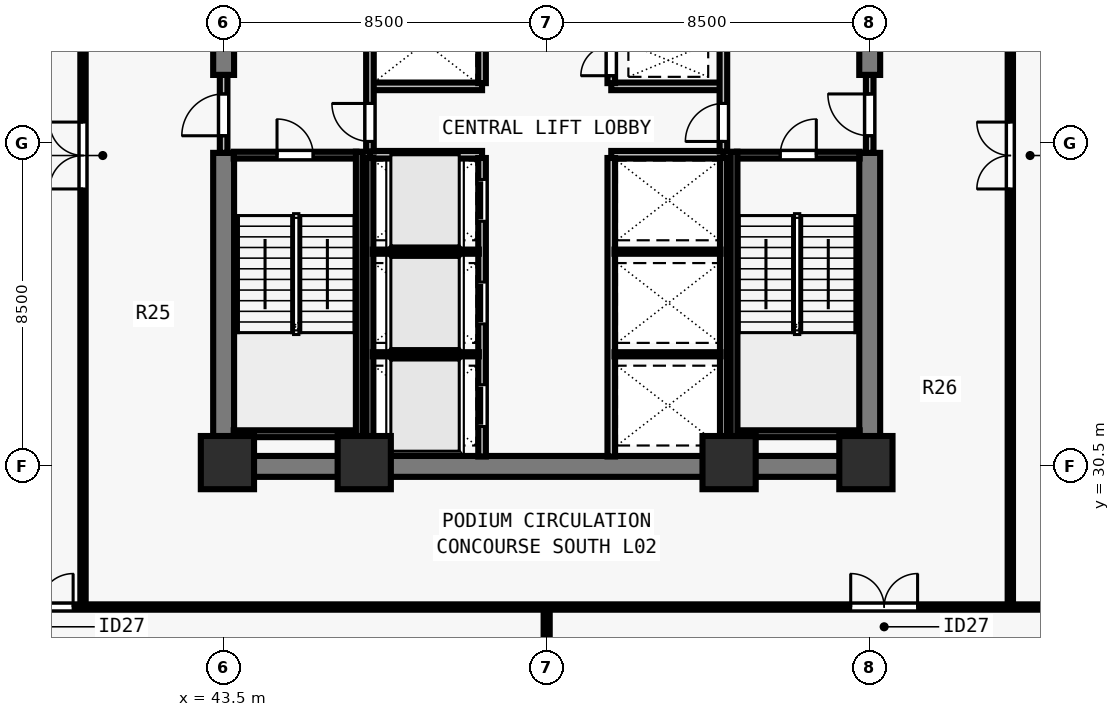
"""IFC4 building model, lengths in metres.
Left out: names, types, materials, properties, quantities, classifications, styles, units other than length and angle.
Written with IfcOpenShell. Run it as: python <this file> out.ifc"""

import sys

from ifc_helpers import new_model, si_unit, direction, frame, frame_2d, origin, origin_2d, place, context, subcontext, project, spatial, rectangle, extrude, element, fill, save


model = new_model("IFC4")
c1 = context("Model", 3, precision=1e-05, world=origin(), true_north=direction((0.0, 1.0)))
c2 = subcontext(c1, "Body", "Model", "MODEL_VIEW")
j1 = project(units=[si_unit("LENGTHUNIT", "METRE"), si_unit("PLANEANGLEUNIT", "RADIAN")], contexts=[c1])
p1 = place(None, origin())
s1 = spatial("IfcSite", under=j1, at=p1, CompositionType="ELEMENT")
p2 = place(p1, origin())
s2 = spatial("IfcBuilding", under=s1, at=p2, CompositionType="ELEMENT")
p3 = place(p2, frame((0.0, 0.0, 10.0)))
s3 = spatial("IfcBuildingStorey", under=s2, at=p3, CompositionType="ELEMENT", Elevation=10.0)
for number, where, z_axis, x_axis in (
    (1, (43.6, 30.6, 0.0), (0.0, 0.0, 1.0), (1.0, 0.0, 0.0)),
    (2, (47.2, 30.6, 0.0), (0.0, 0.0, 1.0), (1.0, 0.0, 0.0)),
    (3, (56.8, 30.6, 0.0), (0.0, 0.0, 1.0), (1.0, 0.0, 0.0)),
    (4, (60.4, 30.6, 0.0), (0.0, 0.0, 1.0), (1.0, 0.0, 0.0)),
):
    element("IfcColumn", number, at=place(p3, frame(where, z_axis=z_axis, x_axis=x_axis)), inside=s3, PredefinedType="COLUMN", context=c2, shape_type="SweptSolid", body=[
        extrude(rectangle(XDim=1.4, YDim=1.4, at=origin_2d()), origin(), (0.0, 0.0, 1.0), 4.5),
    ])
p4 = place(p3, frame((43.225, 30.5, 0.0), z_axis=(0.0, 0.0, 1.0), x_axis=(1.0, 0.0, 0.0)))
e5 = element("IfcWall", 5, at=p4, inside=s3, PredefinedType="SHEAR", context=c2, shape_type="SweptSolid", body=[
    extrude(rectangle(XDim=17.55, YDim=0.55, at=frame_2d((8.775, 0.0))), origin(), (0.0, 0.0, 1.0), 4.22),
])
p5 = place(p3, frame((43.5, 30.765, 0.0), z_axis=(0.0, 0.0, 1.0), x_axis=(0.0, 1.0, 0.0)))
e6 = element("IfcWall", 6, at=p5, inside=s3, PredefinedType="SHEAR", context=c2, shape_type="SweptSolid", body=[
    extrude(rectangle(XDim=7.985, YDim=0.55, at=frame_2d((3.993, 0.0))), origin(), (0.0, 0.0, 1.0), 4.22),
])
p6 = place(p3, frame((43.5, 40.8, 0.0), z_axis=(0.0, 0.0, 1.0), x_axis=(0.0, 1.0, 0.0)))
e7 = element("IfcWall", 7, at=p6, inside=s3, PredefinedType="SHEAR", context=c2, shape_type="SweptSolid", body=[
    extrude(rectangle(XDim=6.435, YDim=0.55, at=frame_2d((3.218, 0.0))), origin(), (0.0, 0.0, 1.0), 4.22),
])
p7 = place(p3, frame((60.5, 30.765, 0.0), z_axis=(0.0, 0.0, 1.0), x_axis=(0.0, 1.0, 0.0)))
e8 = element("IfcWall", 8, at=p7, inside=s3, PredefinedType="SHEAR", context=c2, shape_type="SweptSolid", body=[
    extrude(rectangle(XDim=7.985, YDim=0.55, at=frame_2d((3.993, 0.0))), origin(), (0.0, 0.0, 1.0), 4.22),
])
p8 = place(p3, frame((60.5, 40.8, 0.0), z_axis=(0.0, 0.0, 1.0), x_axis=(0.0, 1.0, 0.0)))
e9 = element("IfcWall", 9, at=p8, inside=s3, PredefinedType="SHEAR", context=c2, shape_type="SweptSolid", body=[
    extrude(rectangle(XDim=6.435, YDim=0.55, at=frame_2d((3.218, 0.0))), origin(), (0.0, 0.0, 1.0), 4.22),
])
for number, where, z_axis, x_axis in (
    (10, (47.35, 38.7, 0.0), (0.0, 0.0, 1.0), (1.0, 0.0, 0.0)),
    (11, (47.35, 40.5, 0.0), (0.0, 0.0, 1.0), (1.0, 0.0, 0.0)),
    (12, (53.7, 38.7, 0.0), (0.0, 0.0, 1.0), (1.0, 0.0, 0.0)),
    (13, (53.7, 40.5, 0.0), (0.0, 0.0, 1.0), (1.0, 0.0, 0.0)),
):
    element("IfcWall", number, at=place(p3, frame(where, z_axis=z_axis, x_axis=x_axis)), inside=s3, PredefinedType="SOLIDWALL", context=c2, shape_type="SweptSolid", body=[
        extrude(rectangle(XDim=2.95, YDim=0.2, at=frame_2d((1.475, 0.0))), origin(), (0.0, 0.0, 1.0), 4.22),
    ])
p9 = place(p3, frame((50.3, 30.76, 0.0), z_axis=(0.0, 0.0, 1.0), x_axis=(0.0, 1.0, 0.0)))
e14 = element("IfcWall", 14, at=p9, inside=s3, PredefinedType="SOLIDWALL", context=c2, shape_type="SweptSolid", body=[
    extrude(rectangle(XDim=7.855, YDim=0.2, at=frame_2d((3.927, 0.0))), origin(), (0.0, 0.0, 1.0), 4.22),
])
p10 = place(p9, frame((0.79, 0.0, 0.0)))
e15 = element("IfcOpeningElement", 15, at=p10, cuts=e14, PredefinedType="OPENING", context=c2, shape_type="SweptSolid", body=[
    extrude(rectangle(XDim=1.1, YDim=2.2, at=frame_2d((0.55, 1.1))), frame((0.0, 0.11, 0.0), z_axis=(0.0, -1.0, 0.0), x_axis=(1.0, 0.0, 0.0)), (0.0, 0.0, 1.0), 0.22),
])
p11 = place(p9, frame((3.49, 0.0, 0.0)))
e16 = element("IfcOpeningElement", 16, at=p11, cuts=e14, PredefinedType="OPENING", context=c2, shape_type="SweptSolid", body=[
    extrude(rectangle(XDim=1.1, YDim=2.2, at=frame_2d((0.55, 1.1))), frame((0.0, 0.11, 0.0), z_axis=(0.0, -1.0, 0.0), x_axis=(1.0, 0.0, 0.0)), (0.0, 0.0, 1.0), 0.22),
])
p12 = place(p9, frame((6.19, 0.0, 0.0)))
e17 = element("IfcOpeningElement", 17, at=p12, cuts=e14, PredefinedType="OPENING", context=c2, shape_type="SweptSolid", body=[
    extrude(rectangle(XDim=1.1, YDim=2.2, at=frame_2d((0.55, 1.1))), frame((0.0, 0.11, 0.0), z_axis=(0.0, -1.0, 0.0), x_axis=(1.0, 0.0, 0.0)), (0.0, 0.0, 1.0), 0.22),
])
p13 = place(p3, frame((53.7, 30.76, 0.0), z_axis=(0.0, 0.0, 1.0), x_axis=(0.0, 1.0, 0.0)))
e18 = element("IfcWall", 18, at=p13, inside=s3, PredefinedType="SOLIDWALL", context=c2, shape_type="SweptSolid", body=[
    extrude(rectangle(XDim=7.855, YDim=0.2, at=frame_2d((3.927, 0.0))), origin(), (0.0, 0.0, 1.0), 4.22),
])
p14 = place(p3, frame((50.3, 40.585, 0.0), z_axis=(0.0, 0.0, 1.0), x_axis=(0.0, 1.0, 0.0)))
e19 = element("IfcWall", 19, at=p14, inside=s3, PredefinedType="SOLIDWALL", context=c2, shape_type="SweptSolid", body=[
    extrude(rectangle(XDim=6.655, YDim=0.2, at=frame_2d((3.328, 0.0))), origin(), (0.0, 0.0, 1.0), 4.22),
])
p15 = place(p14, frame((5.065, 0.0, 0.0)))
e20 = element("IfcOpeningElement", 20, at=p15, cuts=e19, PredefinedType="OPENING", context=c2, shape_type="SweptSolid", body=[
    extrude(rectangle(XDim=0.8, YDim=2.08, at=frame_2d((0.4, 1.04))), frame((0.0, 0.11, 0.0), z_axis=(0.0, -1.0, 0.0), x_axis=(1.0, 0.0, 0.0)), (0.0, 0.0, 1.0), 0.22),
])
p16 = place(p3, frame((53.7, 40.585, 0.0), z_axis=(0.0, 0.0, 1.0), x_axis=(0.0, 1.0, 0.0)))
e21 = element("IfcWall", 21, at=p16, inside=s3, PredefinedType="SOLIDWALL", context=c2, shape_type="SweptSolid", body=[
    extrude(rectangle(XDim=6.655, YDim=0.2, at=frame_2d((3.328, 0.0))), origin(), (0.0, 0.0, 1.0), 4.22),
])
p17 = place(p16, frame((0.195, 0.0, 0.0)))
e22 = element("IfcOpeningElement", 22, at=p17, cuts=e21, PredefinedType="OPENING", context=c2, shape_type="SweptSolid", body=[
    extrude(rectangle(XDim=0.8, YDim=2.08, at=frame_2d((0.4, 1.04))), frame((0.0, 0.11, 0.0), z_axis=(0.0, -1.0, 0.0), x_axis=(1.0, 0.0, 0.0)), (0.0, 0.0, 1.0), 0.22),
])
p18 = place(p16, frame((3.735, 0.0, 0.0)))
e23 = element("IfcOpeningElement", 23, at=p18, cuts=e21, PredefinedType="OPENING", context=c2, shape_type="SweptSolid", body=[
    extrude(rectangle(XDim=0.9, YDim=2.12, at=frame_2d((0.45, 1.06))), frame((0.0, 0.11, 0.0), z_axis=(0.0, -1.0, 0.0), x_axis=(1.0, 0.0, 0.0)), (0.0, 0.0, 1.0), 0.22),
])
p19 = place(p16, frame((5.395, 0.0, 0.0)))
e24 = element("IfcOpeningElement", 24, at=p19, cuts=e21, PredefinedType="OPENING", context=c2, shape_type="SweptSolid", body=[
    extrude(rectangle(XDim=0.8, YDim=2.1, at=frame_2d((0.4, 1.05))), frame((0.0, 0.11, 0.0), z_axis=(0.0, -1.0, 0.0), x_axis=(1.0, 0.0, 0.0)), (0.0, 0.0, 1.0), 0.22),
])
p20 = place(p3, frame((43.5, 38.75, 0.0), z_axis=(0.0, 0.0, 1.0), x_axis=(0.0, 1.0, 0.0)))
e25 = element("IfcWall", 25, at=p20, inside=s3, PredefinedType="SOLIDWALL", context=c2, shape_type="SweptSolid", body=[
    extrude(rectangle(XDim=2.05, YDim=0.2, at=frame_2d((1.025, 0.0))), origin(), (0.0, 0.0, 1.0), 4.22),
])
p21 = place(p20, frame((0.45, 0.0, 0.0)))
e26 = element("IfcOpeningElement", 26, at=p21, cuts=e25, PredefinedType="OPENING", context=c2, shape_type="SweptSolid", body=[
    extrude(rectangle(XDim=1.1, YDim=2.15, at=frame_2d((0.55, 1.075))), frame((0.0, 0.11, 0.0), z_axis=(0.0, -1.0, 0.0), x_axis=(1.0, 0.0, 0.0)), (0.0, 0.0, 1.0), 0.22),
])
p22 = place(p3, frame((47.35, 38.785, 0.0), z_axis=(0.0, 0.0, 1.0), x_axis=(0.0, 1.0, 0.0)))
e27 = element("IfcWall", 27, at=p22, inside=s3, PredefinedType="SOLIDWALL", context=c2, shape_type="SweptSolid", body=[
    extrude(rectangle(XDim=4.865, YDim=0.2, at=frame_2d((2.433, 0.0))), origin(), (0.0, 0.0, 1.0), 4.22),
])
p23 = place(p22, frame((0.265, 0.0, 0.0)))
e28 = element("IfcOpeningElement", 28, at=p23, cuts=e27, PredefinedType="OPENING", context=c2, shape_type="SweptSolid", body=[
    extrude(rectangle(XDim=1.0, YDim=2.15, at=frame_2d((0.5, 1.075))), frame((0.0, 0.11, 0.0), z_axis=(0.0, -1.0, 0.0), x_axis=(1.0, 0.0, 0.0)), (0.0, 0.0, 1.0), 0.22),
])
p24 = place(p3, frame((60.5, 38.75, 0.0), z_axis=(0.0, 0.0, 1.0), x_axis=(0.0, 1.0, 0.0)))
e29 = element("IfcWall", 29, at=p24, inside=s3, PredefinedType="SOLIDWALL", context=c2, shape_type="SweptSolid", body=[
    extrude(rectangle(XDim=2.05, YDim=0.2, at=frame_2d((1.025, 0.0))), origin(), (0.0, 0.0, 1.0), 4.22),
])
p25 = place(p24, frame((0.45, 0.0, 0.0)))
e30 = element("IfcOpeningElement", 30, at=p25, cuts=e29, PredefinedType="OPENING", context=c2, shape_type="SweptSolid", body=[
    extrude(rectangle(XDim=1.1, YDim=2.15, at=frame_2d((0.55, 1.075))), frame((0.0, 0.11, 0.0), z_axis=(0.0, -1.0, 0.0), x_axis=(1.0, 0.0, 0.0)), (0.0, 0.0, 1.0), 0.22),
])
p26 = place(p3, frame((56.65, 38.785, 0.0), z_axis=(0.0, 0.0, 1.0), x_axis=(0.0, 1.0, 0.0)))
e31 = element("IfcWall", 31, at=p26, inside=s3, PredefinedType="SOLIDWALL", context=c2, shape_type="SweptSolid", body=[
    extrude(rectangle(XDim=4.865, YDim=0.2, at=frame_2d((2.433, 0.0))), origin(), (0.0, 0.0, 1.0), 4.22),
])
p27 = place(p26, frame((0.265, 0.0, 0.0)))
e32 = element("IfcOpeningElement", 32, at=p27, cuts=e31, PredefinedType="OPENING", context=c2, shape_type="SweptSolid", body=[
    extrude(rectangle(XDim=1.0, YDim=2.15, at=frame_2d((0.5, 1.075))), frame((0.0, 0.11, 0.0), z_axis=(0.0, -1.0, 0.0), x_axis=(1.0, 0.0, 0.0)), (0.0, 0.0, 1.0), 0.22),
])
p28 = place(p3, frame((47.35, 30.76, 0.0), z_axis=(0.0, 0.0, 1.0), x_axis=(0.0, 1.0, 0.0)))
e33 = element("IfcWall", 33, at=p28, inside=s3, PredefinedType="SOLIDWALL", context=c2, shape_type="SweptSolid", body=[
    extrude(rectangle(XDim=7.855, YDim=0.18, at=frame_2d((3.927, 0.0))), origin(), (0.0, 0.0, 1.0), 4.22),
])
for number, where, z_axis, x_axis in (
    (34, (47.425, 33.45, 0.0), (0.0, 0.0, 1.0), (1.0, 0.0, 0.0)),
    (35, (47.425, 36.15, 0.0), (0.0, 0.0, 1.0), (1.0, 0.0, 0.0)),
):
    element("IfcWall", number, at=place(p3, frame(where, z_axis=z_axis, x_axis=x_axis)), inside=s3, PredefinedType="PARTITIONING", context=c2, shape_type="SweptSolid", body=[
        extrude(rectangle(XDim=2.79, YDim=0.11, at=frame_2d((1.395, 0.0))), origin(), (0.0, 0.0, 1.0), 4.22),
    ])
p29 = place(p3, frame((56.65, 30.76, 0.0), z_axis=(0.0, 0.0, 1.0), x_axis=(0.0, 1.0, 0.0)))
e36 = element("IfcWall", 36, at=p29, inside=s3, PredefinedType="SOLIDWALL", context=c2, shape_type="SweptSolid", body=[
    extrude(rectangle(XDim=7.855, YDim=0.18, at=frame_2d((3.927, 0.0))), origin(), (0.0, 0.0, 1.0), 4.22),
])
for number, where, z_axis, x_axis in (
    (37, (53.785, 33.45, 0.0), (0.0, 0.0, 1.0), (1.0, 0.0, 0.0)),
    (38, (53.785, 36.15, 0.0), (0.0, 0.0, 1.0), (1.0, 0.0, 0.0)),
):
    element("IfcWall", number, at=place(p3, frame(where, z_axis=z_axis, x_axis=x_axis)), inside=s3, PredefinedType="PARTITIONING", context=c2, shape_type="SweptSolid", body=[
        extrude(rectangle(XDim=2.79, YDim=0.11, at=frame_2d((1.395, 0.0))), origin(), (0.0, 0.0, 1.0), 4.22),
    ])
p30 = place(p3, frame((18.865, 26.8, 0.0), z_axis=(0.0, 0.0, 1.0), x_axis=(1.0, 0.0, 0.0)))
e39 = element("IfcWall", 39, at=p30, inside=s3, PredefinedType="PARTITIONING", context=c2, shape_type="SweptSolid", body=[
    extrude(rectangle(XDim=66.27, YDim=0.14, at=frame_2d((33.135, 0.0))), origin(), (0.0, 0.0, 1.0), 3.738),
])
p31 = place(p30, frame((18.915, 0.0, 0.0)))
e40 = element("IfcOpeningElement", 40, at=p31, cuts=e39, PredefinedType="OPENING", context=c2, shape_type="SweptSolid", body=[
    extrude(rectangle(XDim=1.76, YDim=2.2, at=frame_2d((0.88, 1.1))), frame((0.0, 0.08, 0.0), z_axis=(0.0, -1.0, 0.0), x_axis=(1.0, 0.0, 0.0)), (0.0, 0.0, 1.0), 0.16),
])
p32 = place(p30, frame((41.135, 0.0, 0.0)))
e41 = element("IfcOpeningElement", 41, at=p32, cuts=e39, PredefinedType="OPENING", context=c2, shape_type="SweptSolid", body=[
    extrude(rectangle(XDim=1.76, YDim=2.2, at=frame_2d((0.88, 1.1))), frame((0.0, 0.08, 0.0), z_axis=(0.0, -1.0, 0.0), x_axis=(1.0, 0.0, 0.0)), (0.0, 0.0, 1.0), 0.16),
])
p33 = place(p3, frame((39.8, 26.855, 0.0), z_axis=(0.0, 0.0, 1.0), x_axis=(0.0, 1.0, 0.0)))
e42 = element("IfcWall", 42, at=p33, inside=s3, PredefinedType="PARTITIONING", context=c2, shape_type="SweptSolid", body=[
    extrude(rectangle(XDim=24.29, YDim=0.14, at=frame_2d((12.145, 0.0))), origin(), (0.0, 0.0, 1.0), 4.22),
])
p34 = place(p33, frame((10.945, 0.0, 0.0)))
e43 = element("IfcOpeningElement", 43, at=p34, cuts=e42, PredefinedType="OPENING", context=c2, shape_type="SweptSolid", body=[
    extrude(rectangle(XDim=1.76, YDim=2.2, at=frame_2d((0.88, 1.1))), frame((0.0, 0.08, 0.0), z_axis=(0.0, -1.0, 0.0), x_axis=(1.0, 0.0, 0.0)), (0.0, 0.0, 1.0), 0.16),
])
p35 = place(p3, frame((64.2, 26.855, 0.0), z_axis=(0.0, 0.0, 1.0), x_axis=(0.0, 1.0, 0.0)))
e44 = element("IfcWall", 44, at=p35, inside=s3, PredefinedType="PARTITIONING", context=c2, shape_type="SweptSolid", body=[
    extrude(rectangle(XDim=24.29, YDim=0.14, at=frame_2d((12.145, 0.0))), origin(), (0.0, 0.0, 1.0), 4.22),
])
p36 = place(p35, frame((10.945, 0.0, 0.0)))
e45 = element("IfcOpeningElement", 45, at=p36, cuts=e44, PredefinedType="OPENING", context=c2, shape_type="SweptSolid", body=[
    extrude(rectangle(XDim=1.76, YDim=2.2, at=frame_2d((0.88, 1.1))), frame((0.0, 0.08, 0.0), z_axis=(0.0, -1.0, 0.0), x_axis=(1.0, 0.0, 0.0)), (0.0, 0.0, 1.0), 0.16),
])
p37 = place(p3, frame((52.0, 12.22, 0.0), z_axis=(0.0, 0.0, 1.0), x_axis=(0.0, 1.0, 0.0)))
e46 = element("IfcWall", 46, at=p37, inside=s3, PredefinedType="PARTITIONING", context=c2, shape_type="SweptSolid", body=[
    extrude(rectangle(XDim=14.48, YDim=0.16, at=frame_2d((7.24, 0.0))), origin(), (0.0, 0.0, 1.0), 4.22),
])
p38 = place(p3, frame((43.765, 38.69, 0.0), z_axis=(0.0, 0.0, 1.0), x_axis=(1.0, 0.0, 0.0)))
e47 = element("IfcWall", 47, at=p38, inside=s3, PredefinedType="SOLIDWALL", context=c2, shape_type="SweptSolid", body=[
    extrude(rectangle(XDim=3.23, YDim=0.18, at=frame_2d((1.615, 0.0))), origin(), (0.0, 0.0, 1.0), 4.22),
])
p39 = place(p38, frame((1.14, 0.0, 0.0)))
e48 = element("IfcOpeningElement", 48, at=p39, cuts=e47, PredefinedType="OPENING", context=c2, shape_type="SweptSolid", body=[
    extrude(rectangle(XDim=0.95, YDim=2.15, at=frame_2d((0.475, 1.075))), frame((0.0, 0.1, 0.0), z_axis=(0.0, -1.0, 0.0), x_axis=(1.0, 0.0, 0.0)), (0.0, 0.0, 1.0), 0.2),
])
p40 = place(p3, frame((43.765, 31.36, 0.0), z_axis=(0.0, 0.0, 1.0), x_axis=(1.0, 0.0, 0.0)))
e49 = element("IfcWall", 49, at=p40, inside=s3, PredefinedType="SOLIDWALL", context=c2, shape_type="SweptSolid", body=[
    extrude(rectangle(XDim=3.23, YDim=0.18, at=frame_2d((1.615, 0.0))), origin(), (0.0, 0.0, 1.0), 4.22),
])
p41 = place(p3, frame((47.07, 38.78, 0.0), z_axis=(0.0, 0.0, 1.0), x_axis=(0.0, -1.0, 0.0)))
e50 = element("IfcWall", 50, at=p41, inside=s3, PredefinedType="SOLIDWALL", context=c2, shape_type="SweptSolid", body=[
    extrude(rectangle(XDim=8.017, YDim=0.18, at=frame_2d((4.009, 0.0))), origin(), (0.0, 0.0, 1.0), 4.22),
])
p42 = place(p3, frame((57.005, 38.69, 0.0), z_axis=(0.0, 0.0, 1.0), x_axis=(1.0, 0.0, 0.0)))
e51 = element("IfcWall", 51, at=p42, inside=s3, PredefinedType="SOLIDWALL", context=c2, shape_type="SweptSolid", body=[
    extrude(rectangle(XDim=3.23, YDim=0.18, at=frame_2d((1.615, 0.0))), origin(), (0.0, 0.0, 1.0), 4.22),
])
p43 = place(p42, frame((1.14, 0.0, 0.0)))
e52 = element("IfcOpeningElement", 52, at=p43, cuts=e51, PredefinedType="OPENING", context=c2, shape_type="SweptSolid", body=[
    extrude(rectangle(XDim=0.95, YDim=2.15, at=frame_2d((0.475, 1.075))), frame((0.0, 0.1, 0.0), z_axis=(0.0, -1.0, 0.0), x_axis=(1.0, 0.0, 0.0)), (0.0, 0.0, 1.0), 0.2),
])
p44 = place(p3, frame((57.005, 31.36, 0.0), z_axis=(0.0, 0.0, 1.0), x_axis=(1.0, 0.0, 0.0)))
e53 = element("IfcWall", 53, at=p44, inside=s3, PredefinedType="SOLIDWALL", context=c2, shape_type="SweptSolid", body=[
    extrude(rectangle(XDim=3.23, YDim=0.18, at=frame_2d((1.615, 0.0))), origin(), (0.0, 0.0, 1.0), 4.22),
])
p45 = place(p3, frame((56.93, 38.78, 0.0), z_axis=(0.0, 0.0, 1.0), x_axis=(0.0, -1.0, 0.0)))
e54 = element("IfcWall", 54, at=p45, inside=s3, PredefinedType="SOLIDWALL", context=c2, shape_type="SweptSolid", body=[
    extrude(rectangle(XDim=8.017, YDim=0.18, at=frame_2d((4.009, 0.0))), origin(), (0.0, 0.0, 1.0), 4.22),
])
p46 = place(p21, origin())
e55 = element("IfcDoor", 55, at=p46, inside=s3, OperationType="SINGLE_SWING_LEFT", PredefinedType="DOOR", context=c2, shape_type="SweptSolid", body=[
    extrude(rectangle(XDim=1.1, YDim=2.15, at=frame_2d((0.55, 1.075))), frame((0.0, 0.025, 0.0), z_axis=(0.0, -1.0, 0.0), x_axis=(1.0, 0.0, 0.0)), (0.0, 0.0, 1.0), 0.05),
])
fill(e26, e55)
p47 = place(p23, origin())
e56 = element("IfcDoor", 56, at=p47, inside=s3, OperationType="SINGLE_SWING_RIGHT", PredefinedType="DOOR", context=c2, shape_type="SweptSolid", body=[
    extrude(rectangle(XDim=1.0, YDim=2.15, at=frame_2d((0.5, 1.075))), frame((0.0, 0.025, 0.0), z_axis=(0.0, -1.0, 0.0), x_axis=(1.0, 0.0, 0.0)), (0.0, 0.0, 1.0), 0.05),
])
fill(e28, e56)
p48 = place(p25, origin())
e57 = element("IfcDoor", 57, at=p48, inside=s3, OperationType="SINGLE_SWING_RIGHT", PredefinedType="DOOR", context=c2, shape_type="SweptSolid", body=[
    extrude(rectangle(XDim=1.1, YDim=2.15, at=frame_2d((0.55, 1.075))), frame((0.0, 0.025, 0.0), z_axis=(0.0, -1.0, 0.0), x_axis=(1.0, 0.0, 0.0)), (0.0, 0.0, 1.0), 0.05),
])
fill(e30, e57)
p49 = place(p27, origin())
e58 = element("IfcDoor", 58, at=p49, inside=s3, OperationType="SINGLE_SWING_LEFT", PredefinedType="DOOR", context=c2, shape_type="SweptSolid", body=[
    extrude(rectangle(XDim=1.0, YDim=2.15, at=frame_2d((0.5, 1.075))), frame((0.0, 0.025, 0.0), z_axis=(0.0, -1.0, 0.0), x_axis=(1.0, 0.0, 0.0)), (0.0, 0.0, 1.0), 0.05),
])
fill(e32, e58)
p50 = place(p10, origin())
e59 = element("IfcDoor", 59, at=p50, inside=s3, OperationType="SLIDING_TO_LEFT", PredefinedType="DOOR", context=c2, shape_type="SweptSolid", body=[
    extrude(rectangle(XDim=1.1, YDim=2.2, at=frame_2d((0.55, 1.1))), frame((0.0, 0.025, 0.0), z_axis=(0.0, -1.0, 0.0), x_axis=(1.0, 0.0, 0.0)), (0.0, 0.0, 1.0), 0.05),
])
fill(e15, e59)
p51 = place(p11, origin())
e60 = element("IfcDoor", 60, at=p51, inside=s3, OperationType="SLIDING_TO_LEFT", PredefinedType="DOOR", context=c2, shape_type="SweptSolid", body=[
    extrude(rectangle(XDim=1.1, YDim=2.2, at=frame_2d((0.55, 1.1))), frame((0.0, 0.025, 0.0), z_axis=(0.0, -1.0, 0.0), x_axis=(1.0, 0.0, 0.0)), (0.0, 0.0, 1.0), 0.05),
])
fill(e16, e60)
p52 = place(p12, origin())
e61 = element("IfcDoor", 61, at=p52, inside=s3, OperationType="SLIDING_TO_LEFT", PredefinedType="DOOR", context=c2, shape_type="SweptSolid", body=[
    extrude(rectangle(XDim=1.1, YDim=2.2, at=frame_2d((0.55, 1.1))), frame((0.0, 0.025, 0.0), z_axis=(0.0, -1.0, 0.0), x_axis=(1.0, 0.0, 0.0)), (0.0, 0.0, 1.0), 0.05),
])
fill(e17, e61)
p53 = place(p17, origin())
e62 = element("IfcDoor", 62, at=p53, inside=s3, OperationType="SINGLE_SWING_LEFT", PredefinedType="DOOR", context=c2, shape_type="SweptSolid", body=[
    extrude(rectangle(XDim=0.8, YDim=2.08, at=frame_2d((0.4, 1.04))), frame((0.0, 0.025, 0.0), z_axis=(0.0, -1.0, 0.0), x_axis=(1.0, 0.0, 0.0)), (0.0, 0.0, 1.0), 0.05),
])
fill(e22, e62)
p54 = place(p31, origin())
e63 = element("IfcDoor", 63, at=p54, inside=s3, OperationType="DOUBLE_DOOR_SINGLE_SWING", PredefinedType="DOOR", context=c2, shape_type="SweptSolid", body=[
    extrude(rectangle(XDim=1.76, YDim=2.2, at=frame_2d((0.88, 1.1))), frame((0.0, 0.025, 0.0), z_axis=(0.0, -1.0, 0.0), x_axis=(1.0, 0.0, 0.0)), (0.0, 0.0, 1.0), 0.05),
])
fill(e40, e63)
p55 = place(p32, origin())
e64 = element("IfcDoor", 64, at=p55, inside=s3, OperationType="DOUBLE_DOOR_SINGLE_SWING", PredefinedType="DOOR", context=c2, shape_type="SweptSolid", body=[
    extrude(rectangle(XDim=1.76, YDim=2.2, at=frame_2d((0.88, 1.1))), frame((0.0, 0.025, 0.0), z_axis=(0.0, -1.0, 0.0), x_axis=(1.0, 0.0, 0.0)), (0.0, 0.0, 1.0), 0.05),
])
fill(e41, e64)
p56 = place(p34, origin())
e65 = element("IfcDoor", 65, at=p56, inside=s3, OperationType="DOUBLE_DOOR_SINGLE_SWING", PredefinedType="DOOR", context=c2, shape_type="SweptSolid", body=[
    extrude(rectangle(XDim=1.76, YDim=2.2, at=frame_2d((0.88, 1.1))), frame((0.0, 0.025, 0.0), z_axis=(0.0, -1.0, 0.0), x_axis=(1.0, 0.0, 0.0)), (0.0, 0.0, 1.0), 0.05),
])
fill(e43, e65)
p57 = place(p36, origin())
e66 = element("IfcDoor", 66, at=p57, inside=s3, OperationType="DOUBLE_DOOR_SINGLE_SWING", PredefinedType="DOOR", context=c2, shape_type="SweptSolid", body=[
    extrude(rectangle(XDim=1.76, YDim=2.2, at=frame_2d((0.88, 1.1))), frame((0.0, 0.025, 0.0), z_axis=(0.0, -1.0, 0.0), x_axis=(1.0, 0.0, 0.0)), (0.0, 0.0, 1.0), 0.05),
])
fill(e45, e66)
p58 = place(p39, origin())
e67 = element("IfcDoor", 67, at=p58, inside=s3, OperationType="SINGLE_SWING_LEFT", PredefinedType="DOOR", context=c2, shape_type="SweptSolid", body=[
    extrude(rectangle(XDim=0.95, YDim=2.15, at=frame_2d((0.475, 1.075))), frame((0.0, 0.025, 0.0), z_axis=(0.0, -1.0, 0.0), x_axis=(1.0, 0.0, 0.0)), (0.0, 0.0, 1.0), 0.05),
])
fill(e48, e67)
p59 = place(p43, origin())
e68 = element("IfcDoor", 68, at=p59, inside=s3, OperationType="SINGLE_SWING_RIGHT", PredefinedType="DOOR", context=c2, shape_type="SweptSolid", body=[
    extrude(rectangle(XDim=0.95, YDim=2.15, at=frame_2d((0.475, 1.075))), frame((0.0, 0.025, 0.0), z_axis=(0.0, -1.0, 0.0), x_axis=(1.0, 0.0, 0.0)), (0.0, 0.0, 1.0), 0.05),
])
fill(e52, e68)
save(model, sys.argv[1])
